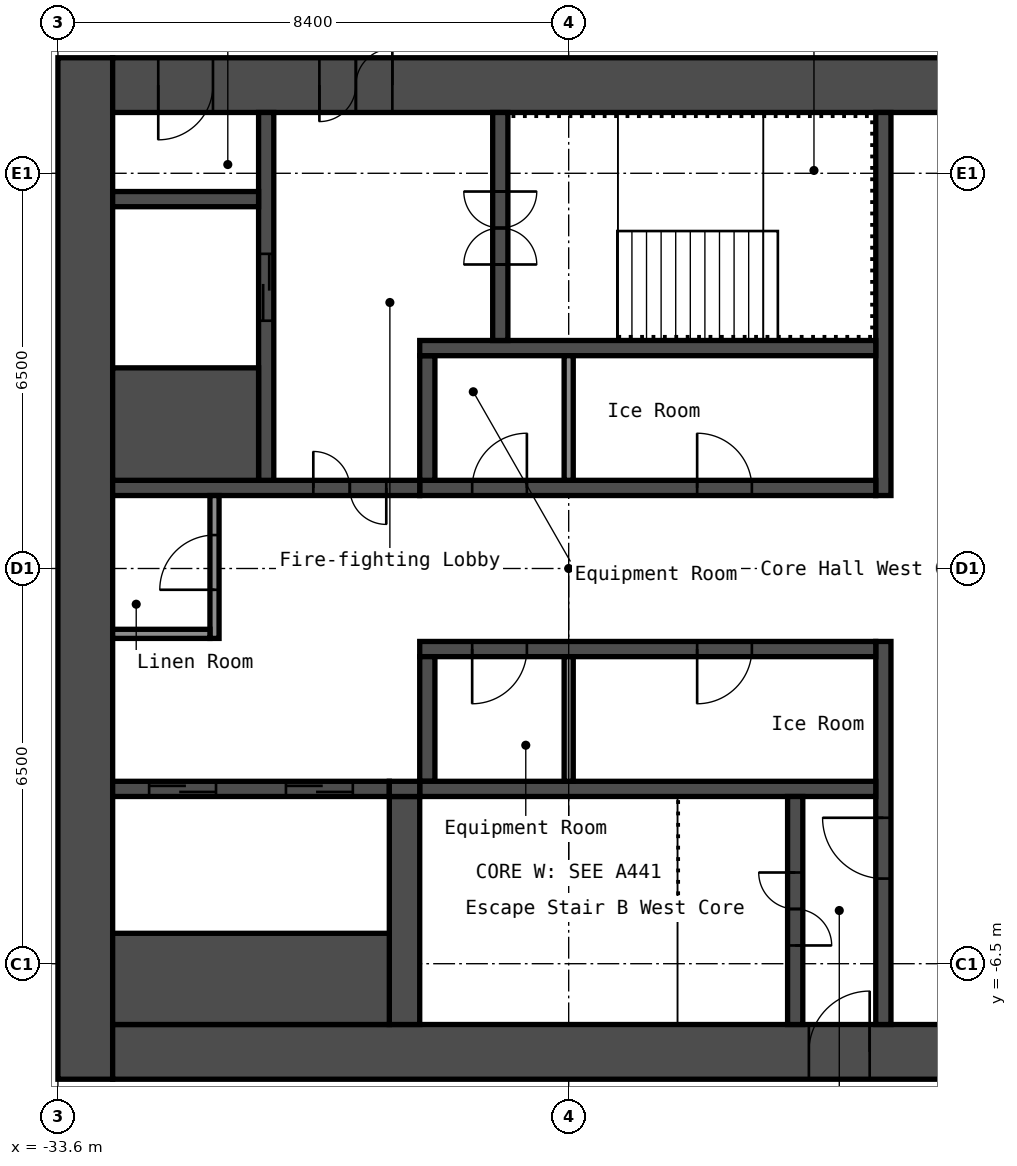
"""IFC4 building model, lengths in metres.
Left out: names, types, materials, properties, quantities, classifications, styles, units other than length and angle.
Written with IfcOpenShell. Run it as: python <this file> out.ifc"""

import sys

from ifc_helpers import new_model, si_unit, direction, frame, frame_2d, origin, place, context, subcontext, project, spatial, rectangle, extrude, element, fill, save


model = new_model("IFC4")
c1 = context("Model", 3, precision=1e-05, world=origin(), true_north=direction((0.0, 1.0)))
c2 = subcontext(c1, "Body", "Model", "MODEL_VIEW")
j1 = project(units=[si_unit("LENGTHUNIT", "METRE"), si_unit("PLANEANGLEUNIT", "RADIAN")], contexts=[c1])
p1 = place(None, origin())
s1 = spatial("IfcSite", under=j1, at=p1, CompositionType="ELEMENT")
p2 = place(p1, origin())
s2 = spatial("IfcBuilding", under=s1, at=p2, CompositionType="ELEMENT")
p3 = place(p2, frame((0.0, 0.0, 280.8)))
s3 = spatial("IfcBuildingStorey", under=s2, at=p3, CompositionType="ELEMENT", Elevation=280.8)
p4 = place(p3, frame((-33.15, -8.4, 0.0), z_axis=(0.0, 0.0, 1.0), x_axis=(0.0, 1.0, 0.0)))
e1 = element("IfcWall", 1, at=p4, inside=s3, PredefinedType="SHEAR", context=c2, shape_type="SweptSolid", body=[
    extrude(rectangle(XDim=16.8, YDim=0.9, at=frame_2d((8.4, 0.0))), origin(), (0.0, 0.0, 1.0), 4.0),
])
p5 = place(p3, frame((-32.7, 7.95, 0.0), z_axis=(0.0, 0.0, 1.0), x_axis=(1.0, 0.0, 0.0)))
e2 = element("IfcWall", 2, at=p5, inside=s3, PredefinedType="SHEAR", context=c2, shape_type="SweptSolid", body=[
    extrude(rectangle(XDim=15.0, YDim=0.9, at=frame_2d((7.5, 0.0))), origin(), (0.0, 0.0, 1.0), 4.0),
])
p6 = place(p5, frame((3.4, 0.0, 0.0)))
e3 = element("IfcOpeningElement", 3, at=p6, cuts=e2, PredefinedType="OPENING", context=c2, shape_type="SweptSolid", body=[
    extrude(rectangle(XDim=1.2, YDim=2.1, at=frame_2d((0.6, 1.05))), frame((0.0, 0.46, 0.0), z_axis=(0.0, -1.0, 0.0), x_axis=(1.0, 0.0, 0.0)), (0.0, 0.0, 1.0), 0.92),
])
p7 = place(p5, frame((0.75, 0.0, 0.0)))
e4 = element("IfcOpeningElement", 4, at=p7, cuts=e2, PredefinedType="OPENING", context=c2, shape_type="SweptSolid", body=[
    extrude(rectangle(XDim=0.9, YDim=2.1, at=frame_2d((0.45, 1.05))), frame((0.0, 0.46, 0.0), z_axis=(0.0, -1.0, 0.0), x_axis=(1.0, 0.0, 0.0)), (0.0, 0.0, 1.0), 0.92),
])
p8 = place(p3, frame((-32.7, -7.95, 0.0), z_axis=(0.0, 0.0, 1.0), x_axis=(1.0, 0.0, 0.0)))
e5 = element("IfcWall", 5, at=p8, inside=s3, PredefinedType="SHEAR", context=c2, shape_type="SweptSolid", body=[
    extrude(rectangle(XDim=15.0, YDim=0.9, at=frame_2d((7.5, 0.0))), origin(), (0.0, 0.0, 1.0), 4.0),
])
p9 = place(p8, frame((11.45, 0.0, 0.0)))
e6 = element("IfcOpeningElement", 6, at=p9, cuts=e5, PredefinedType="OPENING", context=c2, shape_type="SweptSolid", body=[
    extrude(rectangle(XDim=1.0, YDim=2.1, at=frame_2d((0.5, 1.05))), frame((0.0, 0.46, 0.0), z_axis=(0.0, -1.0, 0.0), x_axis=(1.0, 0.0, 0.0)), (0.0, 0.0, 1.0), 0.92),
])
p10 = place(p3, frame((-20.025, 1.2, 0.0), z_axis=(0.0, 0.0, 1.0), x_axis=(0.0, 1.0, 0.0)))
e7 = element("IfcWall", 7, at=p10, inside=s3, PredefinedType="SHEAR", context=c2, shape_type="SweptSolid", body=[
    extrude(rectangle(XDim=6.3, YDim=0.25, at=frame_2d((3.15, 0.0))), origin(), (0.0, 0.0, 1.0), 4.0),
])
p11 = place(p3, frame((-20.025, -7.5, 0.0), z_axis=(0.0, 0.0, 1.0), x_axis=(0.0, 1.0, 0.0)))
e8 = element("IfcWall", 8, at=p11, inside=s3, PredefinedType="SHEAR", context=c2, shape_type="SweptSolid", body=[
    extrude(rectangle(XDim=6.3, YDim=0.25, at=frame_2d((3.15, 0.0))), origin(), (0.0, 0.0, 1.0), 4.0),
])
p12 = place(p11, frame((2.4, 0.0, 0.0)))
e9 = element("IfcOpeningElement", 9, at=p12, cuts=e8, PredefinedType="OPENING", context=c2, shape_type="SweptSolid", body=[
    extrude(rectangle(XDim=1.0, YDim=2.1, at=frame_2d((0.5, 1.05))), frame((0.0, 0.135, 0.0), z_axis=(0.0, -1.0, 0.0), x_axis=(1.0, 0.0, 0.0)), (0.0, 0.0, 1.0), 0.27),
])
p13 = place(p3, frame((-27.65, 1.325, 0.0), z_axis=(0.0, 0.0, 1.0), x_axis=(1.0, 0.0, 0.0)))
e10 = element("IfcWall", 10, at=p13, inside=s3, PredefinedType="SHEAR", context=c2, shape_type="SweptSolid", body=[
    extrude(rectangle(XDim=7.5, YDim=0.25, at=frame_2d((3.75, 0.0))), origin(), (0.0, 0.0, 1.0), 4.0),
])
p14 = place(p13, frame((4.562, 0.0, 0.0)))
e11 = element("IfcOpeningElement", 11, at=p14, cuts=e10, PredefinedType="OPENING", context=c2, shape_type="SweptSolid", body=[
    extrude(rectangle(XDim=0.9, YDim=2.1, at=frame_2d((0.45, 1.05))), frame((0.0, 0.135, 0.0), z_axis=(0.0, -1.0, 0.0), x_axis=(1.0, 0.0, 0.0)), (0.0, 0.0, 1.0), 0.27),
])
p15 = place(p13, frame((0.863, 0.0, 0.0)))
e12 = element("IfcOpeningElement", 12, at=p15, cuts=e10, PredefinedType="OPENING", context=c2, shape_type="SweptSolid", body=[
    extrude(rectangle(XDim=0.9, YDim=2.1, at=frame_2d((0.45, 1.05))), frame((0.0, 0.135, 0.0), z_axis=(0.0, -1.0, 0.0), x_axis=(1.0, 0.0, 0.0)), (0.0, 0.0, 1.0), 0.27),
])
p16 = place(p3, frame((-27.525, 1.45, 0.0), z_axis=(0.0, 0.0, 1.0), x_axis=(0.0, 1.0, 0.0)))
e13 = element("IfcWall", 13, at=p16, inside=s3, PredefinedType="SHEAR", context=c2, shape_type="SweptSolid", body=[
    extrude(rectangle(XDim=2.05, YDim=0.25, at=frame_2d((1.025, 0.0))), origin(), (0.0, 0.0, 1.0), 4.0),
])
p17 = place(p3, frame((-27.65, 3.625, 0.0), z_axis=(0.0, 0.0, 1.0), x_axis=(1.0, 0.0, 0.0)))
e14 = element("IfcWall", 14, at=p17, inside=s3, PredefinedType="SHEAR", context=c2, shape_type="SweptSolid", body=[
    extrude(rectangle(XDim=7.5, YDim=0.25, at=frame_2d((3.75, 0.0))), origin(), (0.0, 0.0, 1.0), 4.0),
])
p18 = place(p3, frame((-26.325, 3.75, 0.0), z_axis=(0.0, 0.0, 1.0), x_axis=(0.0, 1.0, 0.0)))
e15 = element("IfcWall", 15, at=p18, inside=s3, PredefinedType="SHEAR", context=c2, shape_type="SweptSolid", body=[
    extrude(rectangle(XDim=3.75, YDim=0.25, at=frame_2d((1.875, 0.0))), origin(), (0.0, 0.0, 1.0), 4.0),
])
p19 = place(p18, frame((1.25, 0.0, 0.0)))
e16 = element("IfcOpeningElement", 16, at=p19, cuts=e15, PredefinedType="OPENING", context=c2, shape_type="SweptSolid", body=[
    extrude(rectangle(XDim=1.2, YDim=2.1, at=frame_2d((0.6, 1.05))), frame((0.0, 0.135, 0.0), z_axis=(0.0, -1.0, 0.0), x_axis=(1.0, 0.0, 0.0)), (0.0, 0.0, 1.0), 0.27),
])
p20 = place(p3, frame((-32.7, 1.325, 0.0), z_axis=(0.0, 0.0, 1.0), x_axis=(1.0, 0.0, 0.0)))
e17 = element("IfcWall", 17, at=p20, inside=s3, PredefinedType="SHEAR", context=c2, shape_type="SweptSolid", body=[
    extrude(rectangle(XDim=5.05, YDim=0.25, at=frame_2d((2.525, 0.0))), origin(), (0.0, 0.0, 1.0), 4.0),
])
p21 = place(p20, frame((3.3, 0.0, 0.0)))
e18 = element("IfcOpeningElement", 18, at=p21, cuts=e17, PredefinedType="OPENING", context=c2, shape_type="SweptSolid", body=[
    extrude(rectangle(XDim=1.2, YDim=2.1, at=frame_2d((0.6, 1.05))), frame((0.0, 0.135, 0.0), z_axis=(0.0, -1.0, 0.0), x_axis=(1.0, 0.0, 0.0)), (0.0, 0.0, 1.0), 0.27),
])
p22 = place(p3, frame((-30.175, 1.45, 0.0), z_axis=(0.0, 0.0, 1.0), x_axis=(0.0, 1.0, 0.0)))
e19 = element("IfcWall", 19, at=p22, inside=s3, PredefinedType="SHEAR", context=c2, shape_type="SweptSolid", body=[
    extrude(rectangle(XDim=6.05, YDim=0.25, at=frame_2d((3.025, 0.0))), origin(), (0.0, 0.0, 1.0), 4.0),
])
p23 = place(p22, frame((2.625, 0.0, 0.0)))
e20 = element("IfcOpeningElement", 20, at=p23, cuts=e19, PredefinedType="OPENING", context=c2, shape_type="SweptSolid", body=[
    extrude(rectangle(XDim=1.1, YDim=2.1, at=frame_2d((0.55, 1.05))), frame((0.0, 0.135, 0.0), z_axis=(0.0, -1.0, 0.0), x_axis=(1.0, 0.0, 0.0)), (0.0, 0.0, 1.0), 0.27),
])
p24 = place(p3, frame((-32.7, 2.375, 0.0), z_axis=(0.0, 0.0, 1.0), x_axis=(1.0, 0.0, 0.0)))
e21 = element("IfcWall", 21, at=p24, inside=s3, PredefinedType="SHEAR", context=c2, shape_type="SweptSolid", body=[
    extrude(rectangle(XDim=2.4, YDim=1.85, at=frame_2d((1.2, 0.0))), origin(), (0.0, 0.0, 1.0), 4.0),
])
p25 = place(p3, frame((-32.7, 6.075, 0.0), z_axis=(0.0, 0.0, 1.0), x_axis=(1.0, 0.0, 0.0)))
e22 = element("IfcWall", 22, at=p25, inside=s3, PredefinedType="SHEAR", context=c2, shape_type="SweptSolid", body=[
    extrude(rectangle(XDim=2.4, YDim=0.25, at=frame_2d((1.2, 0.0))), origin(), (0.0, 0.0, 1.0), 4.0),
])
p26 = place(p3, frame((-27.65, -1.325, 0.0), z_axis=(0.0, 0.0, 1.0), x_axis=(1.0, 0.0, 0.0)))
e23 = element("IfcWall", 23, at=p26, inside=s3, PredefinedType="SHEAR", context=c2, shape_type="SweptSolid", body=[
    extrude(rectangle(XDim=7.5, YDim=0.25, at=frame_2d((3.75, 0.0))), origin(), (0.0, 0.0, 1.0), 4.0),
])
p27 = place(p26, frame((4.562, 0.0, 0.0)))
e24 = element("IfcOpeningElement", 24, at=p27, cuts=e23, PredefinedType="OPENING", context=c2, shape_type="SweptSolid", body=[
    extrude(rectangle(XDim=0.9, YDim=2.1, at=frame_2d((0.45, 1.05))), frame((0.0, 0.135, 0.0), z_axis=(0.0, -1.0, 0.0), x_axis=(1.0, 0.0, 0.0)), (0.0, 0.0, 1.0), 0.27),
])
p28 = place(p26, frame((0.863, 0.0, 0.0)))
e25 = element("IfcOpeningElement", 25, at=p28, cuts=e23, PredefinedType="OPENING", context=c2, shape_type="SweptSolid", body=[
    extrude(rectangle(XDim=0.9, YDim=2.1, at=frame_2d((0.45, 1.05))), frame((0.0, 0.135, 0.0), z_axis=(0.0, -1.0, 0.0), x_axis=(1.0, 0.0, 0.0)), (0.0, 0.0, 1.0), 0.27),
])
p29 = place(p3, frame((-27.525, -3.5, 0.0), z_axis=(0.0, 0.0, 1.0), x_axis=(0.0, 1.0, 0.0)))
e26 = element("IfcWall", 26, at=p29, inside=s3, PredefinedType="SHEAR", context=c2, shape_type="SweptSolid", body=[
    extrude(rectangle(XDim=2.05, YDim=0.25, at=frame_2d((1.025, 0.0))), origin(), (0.0, 0.0, 1.0), 4.0),
])
p30 = place(p3, frame((-27.65, -3.625, 0.0), z_axis=(0.0, 0.0, 1.0), x_axis=(1.0, 0.0, 0.0)))
e27 = element("IfcWall", 27, at=p30, inside=s3, PredefinedType="SHEAR", context=c2, shape_type="SweptSolid", body=[
    extrude(rectangle(XDim=7.5, YDim=0.25, at=frame_2d((3.75, 0.0))), origin(), (0.0, 0.0, 1.0), 4.0),
])
p31 = place(p3, frame((-21.475, -7.5, 0.0), z_axis=(0.0, 0.0, 1.0), x_axis=(0.0, 1.0, 0.0)))
e28 = element("IfcWall", 28, at=p31, inside=s3, PredefinedType="SHEAR", context=c2, shape_type="SweptSolid", body=[
    extrude(rectangle(XDim=3.75, YDim=0.25, at=frame_2d((1.875, 0.0))), origin(), (0.0, 0.0, 1.0), 4.0),
])
p32 = place(p31, frame((1.3, 0.0, 0.0)))
e29 = element("IfcOpeningElement", 29, at=p32, cuts=e28, PredefinedType="OPENING", context=c2, shape_type="SweptSolid", body=[
    extrude(rectangle(XDim=1.2, YDim=2.1, at=frame_2d((0.6, 1.05))), frame((0.0, 0.135, 0.0), z_axis=(0.0, -1.0, 0.0), x_axis=(1.0, 0.0, 0.0)), (0.0, 0.0, 1.0), 0.27),
])
p33 = place(p3, frame((-27.9, -7.5, 0.0), z_axis=(0.0, 0.0, 1.0), x_axis=(0.0, 1.0, 0.0)))
e30 = element("IfcWall", 30, at=p33, inside=s3, PredefinedType="SHEAR", context=c2, shape_type="SweptSolid", body=[
    extrude(rectangle(XDim=3.75, YDim=0.5, at=frame_2d((1.875, 0.0))), origin(), (0.0, 0.0, 1.0), 4.0),
])
p34 = place(p3, frame((-32.7, -3.625, 0.0), z_axis=(0.0, 0.0, 1.0), x_axis=(1.0, 0.0, 0.0)))
e31 = element("IfcWall", 31, at=p34, inside=s3, PredefinedType="SHEAR", context=c2, shape_type="SweptSolid", body=[
    extrude(rectangle(XDim=4.55, YDim=0.25, at=frame_2d((2.275, 0.0))), origin(), (0.0, 0.0, 1.0), 4.0),
])
p35 = place(p34, frame((2.85, 0.0, 0.0)))
e32 = element("IfcOpeningElement", 32, at=p35, cuts=e31, PredefinedType="OPENING", context=c2, shape_type="SweptSolid", body=[
    extrude(rectangle(XDim=1.1, YDim=2.1, at=frame_2d((0.55, 1.05))), frame((0.0, 0.135, 0.0), z_axis=(0.0, -1.0, 0.0), x_axis=(1.0, 0.0, 0.0)), (0.0, 0.0, 1.0), 0.27),
])
p36 = place(p34, frame((0.6, 0.0, 0.0)))
e33 = element("IfcOpeningElement", 33, at=p36, cuts=e31, PredefinedType="OPENING", context=c2, shape_type="SweptSolid", body=[
    extrude(rectangle(XDim=1.1, YDim=2.1, at=frame_2d((0.55, 1.05))), frame((0.0, 0.135, 0.0), z_axis=(0.0, -1.0, 0.0), x_axis=(1.0, 0.0, 0.0)), (0.0, 0.0, 1.0), 0.27),
])
p37 = place(p3, frame((-32.7, -6.75, 0.0), z_axis=(0.0, 0.0, 1.0), x_axis=(1.0, 0.0, 0.0)))
e34 = element("IfcWall", 34, at=p37, inside=s3, PredefinedType="SHEAR", context=c2, shape_type="SweptSolid", body=[
    extrude(rectangle(XDim=4.55, YDim=1.5, at=frame_2d((2.275, 0.0))), origin(), (0.0, 0.0, 1.0), 4.0),
])
p38 = place(p3, frame((-28.15, -3.625, 0.0), z_axis=(0.0, 0.0, 1.0), x_axis=(1.0, 0.0, 0.0)))
e35 = element("IfcWall", 35, at=p38, inside=s3, PredefinedType="SHEAR", context=c2, shape_type="SweptSolid", body=[
    extrude(rectangle(XDim=0.5, YDim=0.25, at=frame_2d((0.25, 0.0))), origin(), (0.0, 0.0, 1.0), 4.0),
])
p39 = place(p3, frame((-31.025, -1.15, 0.0), z_axis=(0.0, 0.0, 1.0), x_axis=(0.0, 1.0, 0.0)))
e36 = element("IfcWall", 36, at=p39, inside=s3, PredefinedType="PARTITIONING", context=c2, shape_type="SweptSolid", body=[
    extrude(rectangle(XDim=2.35, YDim=0.15, at=frame_2d((1.175, 0.0))), origin(), (0.0, 0.0, 1.0), 4.0),
])
p40 = place(p39, frame((0.8, 0.0, 0.0)))
e37 = element("IfcOpeningElement", 37, at=p40, cuts=e36, PredefinedType="OPENING", context=c2, shape_type="SweptSolid", body=[
    extrude(rectangle(XDim=0.9, YDim=2.1, at=frame_2d((0.45, 1.05))), frame((0.0, 0.085, 0.0), z_axis=(0.0, -1.0, 0.0), x_axis=(1.0, 0.0, 0.0)), (0.0, 0.0, 1.0), 0.17),
])
p41 = place(p3, frame((-32.7, -1.075, 0.0), z_axis=(0.0, 0.0, 1.0), x_axis=(1.0, 0.0, 0.0)))
e38 = element("IfcWall", 38, at=p41, inside=s3, PredefinedType="PARTITIONING", context=c2, shape_type="SweptSolid", body=[
    extrude(rectangle(XDim=1.6, YDim=0.15, at=frame_2d((0.8, 0.0))), origin(), (0.0, 0.0, 1.0), 4.0),
])
for number, where, z_axis, x_axis in (
    (39, (-25.2, 1.45, 0.0), (0.0, 0.0, 1.0), (0.0, 1.0, 0.0)),
    (40, (-25.2, -3.5, 0.0), (0.0, 0.0, 1.0), (0.0, 1.0, 0.0)),
):
    element("IfcWall", number, at=place(p3, frame(where, z_axis=z_axis, x_axis=x_axis)), inside=s3, PredefinedType="PARTITIONING", context=c2, shape_type="SweptSolid", body=[
        extrude(rectangle(XDim=2.05, YDim=0.15, at=frame_2d((1.025, 0.0))), origin(), (0.0, 0.0, 1.0), 4.0),
    ])
p42 = place(p6, origin())
e41 = element("IfcDoor", 41, at=p42, inside=s3, OperationType="DOUBLE_DOOR_SINGLE_SWING", PredefinedType="DOOR", context=c2, shape_type="SweptSolid", body=[
    extrude(rectangle(XDim=1.2, YDim=2.1, at=frame_2d((0.6, 1.05))), frame((0.0, 0.025, 0.0), z_axis=(0.0, -1.0, 0.0), x_axis=(1.0, 0.0, 0.0)), (0.0, 0.0, 1.0), 0.05),
])
fill(e3, e41)
p43 = place(p7, origin())
e42 = element("IfcDoor", 42, at=p43, inside=s3, OperationType="SINGLE_SWING_LEFT", PredefinedType="DOOR", context=c2, shape_type="SweptSolid", body=[
    extrude(rectangle(XDim=0.9, YDim=2.1, at=frame_2d((0.45, 1.05))), frame((0.0, 0.025, 0.0), z_axis=(0.0, -1.0, 0.0), x_axis=(1.0, 0.0, 0.0)), (0.0, 0.0, 1.0), 0.05),
])
fill(e4, e42)
p44 = place(p9, origin())
e43 = element("IfcDoor", 43, at=p44, inside=s3, OperationType="SINGLE_SWING_LEFT", PredefinedType="DOOR", context=c2, shape_type="SweptSolid", body=[
    extrude(rectangle(XDim=1.0, YDim=2.1, at=frame_2d((0.5, 1.05))), frame((0.0, 0.025, 0.0), z_axis=(0.0, -1.0, 0.0), x_axis=(1.0, 0.0, 0.0)), (0.0, 0.0, 1.0), 0.05),
])
fill(e6, e43)
p45 = place(p19, origin())
e44 = element("IfcDoor", 44, at=p45, inside=s3, OperationType="DOUBLE_DOOR_SINGLE_SWING", PredefinedType="DOOR", context=c2, shape_type="SweptSolid", body=[
    extrude(rectangle(XDim=1.2, YDim=2.1, at=frame_2d((0.6, 1.05))), frame((0.0, 0.025, 0.0), z_axis=(0.0, -1.0, 0.0), x_axis=(1.0, 0.0, 0.0)), (0.0, 0.0, 1.0), 0.05),
])
fill(e16, e44)
p46 = place(p32, origin())
e45 = element("IfcDoor", 45, at=p46, inside=s3, OperationType="DOUBLE_DOOR_SINGLE_SWING", PredefinedType="DOOR", context=c2, shape_type="SweptSolid", body=[
    extrude(rectangle(XDim=1.2, YDim=2.1, at=frame_2d((0.6, 1.05))), frame((0.0, 0.025, 0.0), z_axis=(0.0, -1.0, 0.0), x_axis=(1.0, 0.0, 0.0)), (0.0, 0.0, 1.0), 0.05),
])
fill(e29, e45)
p47 = place(p12, origin())
e46 = element("IfcDoor", 46, at=p47, inside=s3, OperationType="SINGLE_SWING_LEFT", PredefinedType="DOOR", context=c2, shape_type="SweptSolid", body=[
    extrude(rectangle(XDim=1.0, YDim=2.1, at=frame_2d((0.5, 1.05))), frame((0.0, 0.025, 0.0), z_axis=(0.0, -1.0, 0.0), x_axis=(1.0, 0.0, 0.0)), (0.0, 0.0, 1.0), 0.05),
])
fill(e9, e46)
p48 = place(p21, origin())
e47 = element("IfcDoor", 47, at=p48, inside=s3, OperationType="DOUBLE_DOOR_SINGLE_SWING", PredefinedType="DOOR", context=c2, shape_type="SweptSolid", body=[
    extrude(rectangle(XDim=1.2, YDim=2.1, at=frame_2d((0.6, 1.05))), frame((0.0, 0.025, 0.0), z_axis=(0.0, -1.0, 0.0), x_axis=(1.0, 0.0, 0.0)), (0.0, 0.0, 1.0), 0.05),
])
fill(e18, e47)
p49 = place(p40, origin())
e48 = element("IfcDoor", 48, at=p49, inside=s3, OperationType="SINGLE_SWING_RIGHT", PredefinedType="DOOR", context=c2, shape_type="SweptSolid", body=[
    extrude(rectangle(XDim=0.9, YDim=2.1, at=frame_2d((0.45, 1.05))), frame((0.0, 0.025, 0.0), z_axis=(0.0, -1.0, 0.0), x_axis=(1.0, 0.0, 0.0)), (0.0, 0.0, 1.0), 0.05),
])
fill(e37, e48)
p50 = place(p14, origin())
e49 = element("IfcDoor", 49, at=p50, inside=s3, OperationType="SINGLE_SWING_RIGHT", PredefinedType="DOOR", context=c2, shape_type="SweptSolid", body=[
    extrude(rectangle(XDim=0.9, YDim=2.1, at=frame_2d((0.45, 1.05))), frame((0.0, 0.025, 0.0), z_axis=(0.0, -1.0, 0.0), x_axis=(1.0, 0.0, 0.0)), (0.0, 0.0, 1.0), 0.05),
])
fill(e11, e49)
p51 = place(p15, origin())
e50 = element("IfcDoor", 50, at=p51, inside=s3, OperationType="SINGLE_SWING_LEFT", PredefinedType="DOOR", context=c2, shape_type="SweptSolid", body=[
    extrude(rectangle(XDim=0.9, YDim=2.1, at=frame_2d((0.45, 1.05))), frame((0.0, 0.025, 0.0), z_axis=(0.0, -1.0, 0.0), x_axis=(1.0, 0.0, 0.0)), (0.0, 0.0, 1.0), 0.05),
])
fill(e12, e50)
p52 = place(p27, origin())
e51 = element("IfcDoor", 51, at=p52, inside=s3, OperationType="SINGLE_SWING_LEFT", PredefinedType="DOOR", context=c2, shape_type="SweptSolid", body=[
    extrude(rectangle(XDim=0.9, YDim=2.1, at=frame_2d((0.45, 1.05))), frame((0.0, 0.025, 0.0), z_axis=(0.0, -1.0, 0.0), x_axis=(1.0, 0.0, 0.0)), (0.0, 0.0, 1.0), 0.05),
])
fill(e24, e51)
p53 = place(p28, origin())
e52 = element("IfcDoor", 52, at=p53, inside=s3, OperationType="SINGLE_SWING_LEFT", PredefinedType="DOOR", context=c2, shape_type="SweptSolid", body=[
    extrude(rectangle(XDim=0.9, YDim=2.1, at=frame_2d((0.45, 1.05))), frame((0.0, 0.025, 0.0), z_axis=(0.0, -1.0, 0.0), x_axis=(1.0, 0.0, 0.0)), (0.0, 0.0, 1.0), 0.05),
])
fill(e25, e52)
p54 = place(p23, origin())
e53 = element("IfcDoor", 53, at=p54, inside=s3, OperationType="DOUBLE_DOOR_SLIDING", PredefinedType="DOOR", context=c2, shape_type="SweptSolid", body=[
    extrude(rectangle(XDim=1.1, YDim=2.1, at=frame_2d((0.55, 1.05))), frame((0.0, 0.025, 0.0), z_axis=(0.0, -1.0, 0.0), x_axis=(1.0, 0.0, 0.0)), (0.0, 0.0, 1.0), 0.05),
])
fill(e20, e53)
p55 = place(p35, origin())
e54 = element("IfcDoor", 54, at=p55, inside=s3, OperationType="DOUBLE_DOOR_SLIDING", PredefinedType="DOOR", context=c2, shape_type="SweptSolid", body=[
    extrude(rectangle(XDim=1.1, YDim=2.1, at=frame_2d((0.55, 1.05))), frame((0.0, 0.025, 0.0), z_axis=(0.0, -1.0, 0.0), x_axis=(1.0, 0.0, 0.0)), (0.0, 0.0, 1.0), 0.05),
])
fill(e32, e54)
p56 = place(p36, origin())
e55 = element("IfcDoor", 55, at=p56, inside=s3, OperationType="DOUBLE_DOOR_SLIDING", PredefinedType="DOOR", context=c2, shape_type="SweptSolid", body=[
    extrude(rectangle(XDim=1.1, YDim=2.1, at=frame_2d((0.55, 1.05))), frame((0.0, 0.025, 0.0), z_axis=(0.0, -1.0, 0.0), x_axis=(1.0, 0.0, 0.0)), (0.0, 0.0, 1.0), 0.05),
])
fill(e33, e55)
p57 = place(p2, frame((0.0, 0.0, 285.0)))
p58 = place(p57, frame((-26.325, 3.75, 0.0), z_axis=(0.0, 0.0, 1.0), x_axis=(0.0, 1.0, 0.0)))
p59 = place(p58, frame((1.25, 0.0, 0.0)))
p60 = place(p59, origin())
e56 = element("IfcDoor", 56, at=p60, inside=s3, OperationType="DOUBLE_DOOR_SINGLE_SWING", PredefinedType="DOOR", context=c2, shape_type="SweptSolid", body=[
    extrude(rectangle(XDim=1.2, YDim=2.1, at=frame_2d((0.6, 1.05))), frame((0.0, 0.025, 0.0), z_axis=(0.0, -1.0, 0.0), x_axis=(1.0, 0.0, 0.0)), (0.0, 0.0, 1.0), 0.05),
])
save(model, sys.argv[1])
